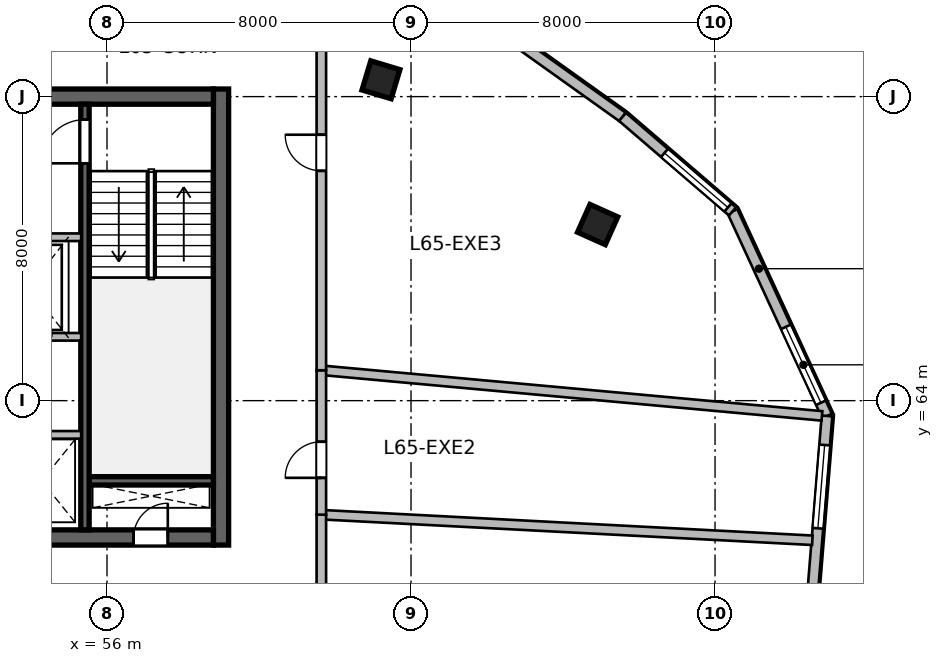
"""IFC4 building model, lengths in metres.
Left out: names, types, materials, properties, quantities, classifications, styles, units other than length and angle.
Written with IfcOpenShell. Run it as: python <this file> out.ifc"""

import sys

from ifc_helpers import new_model, si_unit, direction, frame, frame_2d, origin, origin_2d, place, context, subcontext, project, spatial, rectangle, extrude, source, transform, mapped, element, fill, save


model = new_model("IFC4")
c1 = context("Model", 3, precision=1e-05, world=origin(), true_north=direction((0.0, 1.0)))
c2 = subcontext(c1, "Body", "Model", "MODEL_VIEW")
j1 = project(units=[si_unit("LENGTHUNIT", "METRE"), si_unit("PLANEANGLEUNIT", "RADIAN")], contexts=[c1])
p1 = place(None, origin())
s1 = spatial("IfcSite", under=j1, at=p1, CompositionType="ELEMENT")
p2 = place(p1, origin())
s2 = spatial("IfcBuilding", under=s1, at=p2, CompositionType="ELEMENT")
p3 = place(p2, frame((0.0, 0.0, 267.9)))
s3 = spatial("IfcBuildingStorey", under=s2, at=p3, CompositionType="ELEMENT", Elevation=267.9)
m1 = source(origin(), c2, "Body", "SweptSolid", [
    extrude(rectangle(XDim=12.0, YDim=0.4, at=frame_2d((6.0, 0.0))), origin(), (0.0, 0.0, 1.0), 3.9),
])
p4 = place(p3, frame((59.0, 60.2, 0.0), z_axis=(0.0, 0.0, 1.0), x_axis=(0.0, 1.0, 0.0)))
e1 = element("IfcWall", 1, at=p4, inside=s3, PredefinedType="SHEAR", context=c2, shape_type="MappedRepresentation", body=[
    mapped(m1, transform((0.0, 0.0, 0.0), scale=1.0)),
])
m2 = source(origin(), c2, "Body", "SweptSolid", [
    extrude(rectangle(XDim=21.6, YDim=0.4, at=frame_2d((10.8, 0.0))), origin(), (0.0, 0.0, 1.0), 3.9),
])
p5 = place(p3, frame((37.2, 60.4, 0.0), z_axis=(0.0, 0.0, 1.0), x_axis=(1.0, 0.0, 0.0)))
e2 = element("IfcWall", 2, at=p5, inside=s3, PredefinedType="SHEAR", context=c2, shape_type="MappedRepresentation", body=[
    mapped(m2, transform((0.0, 0.0, 0.0), scale=1.0)),
])
p6 = place(p5, frame((1.1, 0.0, 0.0)))
e3 = element("IfcOpeningElement", 3, at=p6, cuts=e2, PredefinedType="OPENING", context=c2, shape_type="SweptSolid", body=[
    extrude(rectangle(XDim=1.15, YDim=2.15, at=frame_2d((0.575, 1.075))), frame((0.0, 0.21, 0.0), z_axis=(0.0, -1.0, 0.0), x_axis=(1.0, 0.0, 0.0)), (0.0, 0.0, 1.0), 0.42),
])
p7 = place(p5, frame((19.5, 0.0, 0.0)))
e4 = element("IfcOpeningElement", 4, at=p7, cuts=e2, PredefinedType="OPENING", context=c2, shape_type="SweptSolid", body=[
    extrude(rectangle(XDim=0.9, YDim=2.1, at=frame_2d((0.45, 1.05))), frame((0.0, 0.21, 0.0), z_axis=(0.0, -1.0, 0.0), x_axis=(1.0, 0.0, 0.0)), (0.0, 0.0, 1.0), 0.42),
])
p8 = place(p5, frame((12.02, 0.0, 0.0)))
e5 = element("IfcOpeningElement", 5, at=p8, cuts=e2, PredefinedType="OPENING", context=c2, shape_type="SweptSolid", body=[
    extrude(rectangle(XDim=1.6, YDim=2.15, at=frame_2d((0.8, 1.075))), frame((0.0, 0.21, 0.0), z_axis=(0.0, -1.0, 0.0), x_axis=(1.0, 0.0, 0.0)), (0.0, 0.0, 1.0), 0.42),
])
p9 = place(p3, frame((37.2, 72.0, 0.0), z_axis=(0.0, 0.0, 1.0), x_axis=(1.0, 0.0, 0.0)))
e6 = element("IfcWall", 6, at=p9, inside=s3, PredefinedType="SHEAR", context=c2, shape_type="MappedRepresentation", body=[
    mapped(m2, transform((0.0, 0.0, 0.0), scale=1.0)),
])
p10 = place(p9, frame((1.2, 0.0, 0.0)))
e7 = element("IfcOpeningElement", 7, at=p10, cuts=e6, PredefinedType="OPENING", context=c2, shape_type="SweptSolid", body=[
    extrude(rectangle(XDim=0.9, YDim=2.1, at=frame_2d((0.45, 1.05))), frame((0.0, 0.21, 0.0), z_axis=(0.0, -1.0, 0.0), x_axis=(1.0, 0.0, 0.0)), (0.0, 0.0, 1.0), 0.42),
])
p11 = place(p9, frame((14.7, 0.0, 0.0)))
e8 = element("IfcOpeningElement", 8, at=p11, cuts=e6, PredefinedType="OPENING", context=c2, shape_type="SweptSolid", body=[
    extrude(rectangle(XDim=1.2, YDim=2.15, at=frame_2d((0.6, 1.075))), frame((0.0, 0.21, 0.0), z_axis=(0.0, -1.0, 0.0), x_axis=(1.0, 0.0, 0.0)), (0.0, 0.0, 1.0), 0.42),
])
p12 = place(p9, frame((4.15, 0.0, 0.0)))
e9 = element("IfcOpeningElement", 9, at=p12, cuts=e6, PredefinedType="OPENING", context=c2, shape_type="SweptSolid", body=[
    extrude(rectangle(XDim=1.3, YDim=2.15, at=frame_2d((0.65, 1.075))), frame((0.0, 0.21, 0.0), z_axis=(0.0, -1.0, 0.0), x_axis=(1.0, 0.0, 0.0)), (0.0, 0.0, 1.0), 0.42),
])
p13 = place(p9, frame((7.25, 0.0, 0.0)))
e10 = element("IfcOpeningElement", 10, at=p13, cuts=e6, PredefinedType="OPENING", context=c2, shape_type="SweptSolid", body=[
    extrude(rectangle(XDim=0.9, YDim=2.1, at=frame_2d((0.45, 1.05))), frame((0.0, 0.21, 0.0), z_axis=(0.0, -1.0, 0.0), x_axis=(1.0, 0.0, 0.0)), (0.0, 0.0, 1.0), 0.42),
])
p14 = place(p9, frame((10.95, 0.0, 0.0)))
e11 = element("IfcOpeningElement", 11, at=p14, cuts=e6, PredefinedType="OPENING", context=c2, shape_type="SweptSolid", body=[
    extrude(rectangle(XDim=0.9, YDim=2.1, at=frame_2d((0.45, 1.05))), frame((0.0, 0.21, 0.0), z_axis=(0.0, -1.0, 0.0), x_axis=(1.0, 0.0, 0.0)), (0.0, 0.0, 1.0), 0.42),
])
m3 = source(origin(), c2, "Body", "SweptSolid", [
    extrude(rectangle(XDim=3.27, YDim=0.22, at=frame_2d((1.635, 0.0))), origin(), (0.0, 0.0, 1.0), 3.9),
])
p15 = place(p3, frame((55.53, 61.89, 0.0), z_axis=(0.0, 0.0, 1.0), x_axis=(1.0, 0.0, 0.0)))
e12 = element("IfcWall", 12, at=p15, inside=s3, PredefinedType="SHEAR", context=c2, shape_type="MappedRepresentation", body=[
    mapped(m3, transform((0.0, 0.0, 0.0), scale=1.0)),
])
m4 = source(origin(), c2, "Body", "SweptSolid", [
    extrude(rectangle(XDim=11.2, YDim=0.22, at=frame_2d((5.6, 0.0))), origin(), (0.0, 0.0, 1.0), 3.9),
])
p16 = place(p3, frame((55.42, 60.6, 0.0), z_axis=(0.0, 0.0, 1.0), x_axis=(0.0, 1.0, 0.0)))
e13 = element("IfcWall", 13, at=p16, inside=s3, PredefinedType="SHEAR", context=c2, shape_type="MappedRepresentation", body=[
    mapped(m4, transform((0.0, 0.0, 0.0), scale=1.0)),
])
p17 = place(p16, frame((9.645, 0.0, 0.0)))
e14 = element("IfcOpeningElement", 14, at=p17, cuts=e13, PredefinedType="OPENING", context=c2, shape_type="SweptSolid", body=[
    extrude(rectangle(XDim=1.15, YDim=2.15, at=frame_2d((0.575, 1.075))), frame((0.0, 0.12, 0.0), z_axis=(0.0, -1.0, 0.0), x_axis=(1.0, 0.0, 0.0)), (0.0, 0.0, 1.0), 0.24),
])
m5 = source(origin(), c2, "Body", "SweptSolid", [
    extrude(rectangle(XDim=0.8, YDim=0.8, at=origin_2d()), origin(), (0.0, 0.0, 1.0), 3.9),
])
for number, where, z_axis, x_axis in (
    (15, (63.209, 72.442, 0.0), (0.0, 0.0, 1.0), (0.289, 0.957, 0.0)),
    (16, (68.91, 68.633, 0.0), (0.0, 0.0, 1.0), (0.409, 0.912, 0.0)),
):
    element("IfcColumn", number, at=place(p3, frame(where, z_axis=z_axis, x_axis=x_axis)), inside=s3, PredefinedType="COLUMN", context=c2, shape_type="MappedRepresentation", body=[
        mapped(m5, transform((0.0, 0.0, 0.0), scale=1.0)),
    ])
m6 = source(origin(), c2, "Body", "SweptSolid", [
    extrude(rectangle(XDim=5.928, YDim=0.28, at=frame_2d((2.964, 0.0))), origin(), (0.0, 0.0, 1.0), 3.65),
])
p18 = place(p3, frame((72.459, 68.979, 0.0), z_axis=(0.0, 0.0, 1.0), x_axis=(0.41942378221, -0.907790554543, 0.0)))
e17 = element("IfcWall", 17, at=p18, inside=s3, PredefinedType="SOLIDWALL", context=c2, shape_type="MappedRepresentation", body=[
    mapped(m6, transform((0.0, 0.0, 0.0), scale=1.0)),
])
p19 = place(p18, frame((3.346, 0.0, 0.95)))
e18 = element("IfcOpeningElement", 18, at=p19, cuts=e17, PredefinedType="OPENING", context=c2, shape_type="SweptSolid", body=[
    extrude(rectangle(XDim=2.2, YDim=2.1, at=frame_2d((1.1, 1.05))), frame((0.0, 0.15, 0.0), z_axis=(0.0, -1.0, 0.0), x_axis=(1.0, 0.0, 0.0)), (0.0, 0.0, 1.0), 0.3),
])
m7 = source(origin(), c2, "Body", "SweptSolid", [
    extrude(rectangle(XDim=7.466, YDim=0.28, at=frame_2d((3.733, 0.0))), origin(), (0.0, 0.0, 1.0), 3.65),
])
p20 = place(p3, frame((74.946, 63.597, 0.0), z_axis=(0.0, 0.0, 1.0), x_axis=(-0.080804454221, -0.996729973553, 0.0)))
e19 = element("IfcWall", 19, at=p20, inside=s3, PredefinedType="SOLIDWALL", context=c2, shape_type="MappedRepresentation", body=[
    mapped(m7, transform((0.0, 0.0, 0.0), scale=1.0)),
])
p21 = place(p20, frame((0.767, 0.0, 0.95)))
e20 = element("IfcOpeningElement", 20, at=p21, cuts=e19, PredefinedType="OPENING", context=c2, shape_type="SweptSolid", body=[
    extrude(rectangle(XDim=2.2, YDim=2.1, at=frame_2d((1.1, 1.05))), frame((0.0, 0.15, 0.0), z_axis=(0.0, -1.0, 0.0), x_axis=(1.0, 0.0, 0.0)), (0.0, 0.0, 1.0), 0.3),
])
m8 = source(origin(), c2, "Body", "SweptSolid", [
    extrude(rectangle(XDim=3.757, YDim=0.28, at=frame_2d((1.879, 0.0))), origin(), (0.0, 0.0, 1.0), 3.65),
])
p22 = place(p3, frame((66.506, 73.648, 0.0), z_axis=(0.0, 0.0, 1.0), x_axis=(0.814163502266, -0.580635678871, 0.0)))
e21 = element("IfcWall", 21, at=p22, inside=s3, PredefinedType="SOLIDWALL", context=c2, shape_type="MappedRepresentation", body=[
    mapped(m8, transform((0.0, 0.0, 0.0), scale=1.0)),
])
m9 = source(origin(), c2, "Body", "SweptSolid", [
    extrude(rectangle(XDim=3.816, YDim=0.28, at=frame_2d((1.908, 0.0))), origin(), (0.0, 0.0, 1.0), 3.65),
])
p23 = place(p3, frame((69.565, 71.466, 0.0), z_axis=(0.0, 0.0, 1.0), x_axis=(0.758388845672, -0.651802392417, 0.0)))
e22 = element("IfcWall", 22, at=p23, inside=s3, PredefinedType="SOLIDWALL", context=c2, shape_type="MappedRepresentation", body=[
    mapped(m9, transform((0.0, 0.0, 0.0), scale=1.0)),
])
p24 = place(p23, frame((1.456, 0.0, 0.95)))
e23 = element("IfcOpeningElement", 23, at=p24, cuts=e22, PredefinedType="OPENING", context=c2, shape_type="SweptSolid", body=[
    extrude(rectangle(XDim=2.2, YDim=2.1, at=frame_2d((1.1, 1.05))), frame((0.0, 0.15, 0.0), z_axis=(0.0, -1.0, 0.0), x_axis=(1.0, 0.0, 0.0)), (0.0, 0.0, 1.0), 0.3),
])
m10 = source(origin(), c2, "Body", "SweptSolid", [
    extrude(rectangle(XDim=5.62, YDim=0.2, at=frame_2d((2.81, 0.0))), origin(), (0.0, 0.0, 1.0), 3.65),
])
p25 = place(p3, frame((49.7, 68.3, 0.0), z_axis=(0.0, 0.0, 1.0), x_axis=(1.0, 0.0, 0.0)))
e24 = element("IfcWall", 24, at=p25, inside=s3, PredefinedType="SOLIDWALL", context=c2, shape_type="MappedRepresentation", body=[
    mapped(m10, transform((0.0, 0.0, 0.0), scale=1.0)),
])
p26 = place(p25, frame((1.6, 0.0, 0.0)))
e25 = element("IfcOpeningElement", 25, at=p26, cuts=e24, PredefinedType="OPENING", context=c2, shape_type="SweptSolid", body=[
    extrude(rectangle(XDim=1.1, YDim=2.15, at=frame_2d((0.55, 1.075))), frame((0.0, 0.11, 0.0), z_axis=(0.0, -1.0, 0.0), x_axis=(1.0, 0.0, 0.0)), (0.0, 0.0, 1.0), 0.22),
])
p27 = place(p25, frame((3.7, 0.0, 0.0)))
e26 = element("IfcOpeningElement", 26, at=p27, cuts=e24, PredefinedType="OPENING", context=c2, shape_type="SweptSolid", body=[
    extrude(rectangle(XDim=1.1, YDim=2.15, at=frame_2d((0.55, 1.075))), frame((0.0, 0.11, 0.0), z_axis=(0.0, -1.0, 0.0), x_axis=(1.0, 0.0, 0.0)), (0.0, 0.0, 1.0), 0.22),
])
p28 = place(p3, frame((49.7, 65.68, 0.0), z_axis=(0.0, 0.0, 1.0), x_axis=(1.0, 0.0, 0.0)))
e27 = element("IfcWall", 27, at=p28, inside=s3, PredefinedType="SOLIDWALL", context=c2, shape_type="MappedRepresentation", body=[
    mapped(m10, transform((0.0, 0.0, 0.0), scale=1.0)),
])
m11 = source(origin(), c2, "Body", "SweptSolid", [
    extrude(rectangle(XDim=4.1, YDim=0.2, at=frame_2d((2.05, 0.0))), origin(), (0.0, 0.0, 1.0), 3.65),
])
p29 = place(p3, frame((51.22, 63.1, 0.0), z_axis=(0.0, 0.0, 1.0), x_axis=(1.0, 0.0, 0.0)))
e28 = element("IfcWall", 28, at=p29, inside=s3, PredefinedType="SOLIDWALL", context=c2, shape_type="MappedRepresentation", body=[
    mapped(m11, transform((0.0, 0.0, 0.0), scale=1.0)),
])
m12 = source(origin(), c2, "Body", "SweptSolid", [
    extrude(rectangle(XDim=12.938, YDim=0.25, at=frame_2d((6.469, 0.0))), origin(), (0.0, 0.0, 1.0), 3.65),
])
p30 = place(p3, frame((61.64, 61.0, 0.0), z_axis=(0.0, 0.0, 1.0), x_axis=(0.998643821866, -0.052062626215, 0.0)))
e29 = element("IfcWall", 29, at=p30, inside=s3, PredefinedType="PARTITIONING", context=c2, shape_type="MappedRepresentation", body=[
    mapped(m12, transform((0.0, 0.0, 0.0), scale=1.0)),
])
m13 = source(origin(), c2, "Body", "SweptSolid", [
    extrude(rectangle(XDim=3.04, YDim=0.25, at=frame_2d((1.52, 0.0))), origin(), (0.0, 0.0, 1.0), 3.65),
])
p31 = place(p3, frame((61.64, 57.96, 0.0), z_axis=(0.0, 0.0, 1.0), x_axis=(0.0, 1.0, 0.0)))
e30 = element("IfcWall", 30, at=p31, inside=s3, PredefinedType="PARTITIONING", context=c2, shape_type="MappedRepresentation", body=[
    mapped(m13, transform((0.0, 0.0, 0.0), scale=1.0)),
])
m14 = source(origin(), c2, "Body", "SweptSolid", [
    extrude(rectangle(XDim=13.228, YDim=0.25, at=frame_2d((6.614, 0.0))), origin(), (0.0, 0.0, 1.0), 3.65),
])
p32 = place(p3, frame((61.64, 64.8, 0.0), z_axis=(0.0, 0.0, 1.0), x_axis=(0.995868510157, -0.090806995755, 0.0)))
e31 = element("IfcWall", 31, at=p32, inside=s3, PredefinedType="PARTITIONING", context=c2, shape_type="MappedRepresentation", body=[
    mapped(m14, transform((0.0, 0.0, 0.0), scale=1.0)),
])
m15 = source(origin(), c2, "Body", "SweptSolid", [
    extrude(rectangle(XDim=3.8, YDim=0.25, at=frame_2d((1.9, 0.0))), origin(), (0.0, 0.0, 1.0), 3.65),
])
p33 = place(p3, frame((61.64, 61.0, 0.0), z_axis=(0.0, 0.0, 1.0), x_axis=(0.0, 1.0, 0.0)))
e32 = element("IfcWall", 32, at=p33, inside=s3, PredefinedType="PARTITIONING", context=c2, shape_type="MappedRepresentation", body=[
    mapped(m15, transform((0.0, 0.0, 0.0), scale=1.0)),
])
p34 = place(p33, frame((0.969, 0.0, 0.0)))
e33 = element("IfcOpeningElement", 33, at=p34, cuts=e32, PredefinedType="OPENING", context=c2, shape_type="SweptSolid", body=[
    extrude(rectangle(XDim=0.95, YDim=2.1, at=frame_2d((0.475, 1.05))), frame((0.0, 0.135, 0.0), z_axis=(0.0, -1.0, 0.0), x_axis=(1.0, 0.0, 0.0)), (0.0, 0.0, 1.0), 0.27),
])
m16 = source(origin(), c2, "Body", "SweptSolid", [
    extrude(rectangle(XDim=11.445, YDim=0.25, at=frame_2d((5.722, 0.0))), origin(), (0.0, 0.0, 1.0), 3.65),
])
p35 = place(p3, frame((61.64, 64.8, 0.0), z_axis=(0.0, 0.0, 1.0), x_axis=(0.0, 1.0, 0.0)))
e34 = element("IfcWall", 34, at=p35, inside=s3, PredefinedType="PARTITIONING", context=c2, shape_type="MappedRepresentation", body=[
    mapped(m16, transform((0.0, 0.0, 0.0), scale=1.0)),
])
p36 = place(p35, frame((5.247, 0.0, 0.0)))
e35 = element("IfcOpeningElement", 35, at=p36, cuts=e34, PredefinedType="OPENING", context=c2, shape_type="SweptSolid", body=[
    extrude(rectangle(XDim=0.95, YDim=2.1, at=frame_2d((0.475, 1.05))), frame((0.0, 0.135, 0.0), z_axis=(0.0, -1.0, 0.0), x_axis=(1.0, 0.0, 0.0)), (0.0, 0.0, 1.0), 0.27),
])
m17 = source(origin(), c2, "Body", "SweptSolid", [
    extrude(rectangle(XDim=2.2, YDim=2.1, at=frame_2d((1.1, 1.05))), frame((0.0, 0.03, 0.0), z_axis=(0.0, -1.0, 0.0), x_axis=(1.0, 0.0, 0.0)), (0.0, 0.0, 1.0), 0.06),
])
p37 = place(p19, origin())
e36 = element("IfcWindow", 36, at=p37, inside=s3, PartitioningType="TRIPLE_PANEL_VERTICAL", PredefinedType="WINDOW", context=c2, shape_type="MappedRepresentation", body=[
    mapped(m17, transform((0.0, 0.0, 0.0), scale=1.0)),
])
fill(e18, e36)
p38 = place(p21, origin())
e37 = element("IfcWindow", 37, at=p38, inside=s3, PartitioningType="TRIPLE_PANEL_VERTICAL", PredefinedType="WINDOW", context=c2, shape_type="MappedRepresentation", body=[
    mapped(m17, transform((0.0, 0.0, 0.0), scale=1.0)),
])
fill(e20, e37)
p39 = place(p24, origin())
e38 = element("IfcWindow", 38, at=p39, inside=s3, PartitioningType="TRIPLE_PANEL_VERTICAL", PredefinedType="WINDOW", context=c2, shape_type="MappedRepresentation", body=[
    mapped(m17, transform((0.0, 0.0, 0.0), scale=1.0)),
])
fill(e23, e38)
m18 = source(origin(), c2, "Body", "SweptSolid", [
    extrude(rectangle(XDim=0.9, YDim=2.1, at=frame_2d((0.45, 1.05))), frame((0.0, 0.025, 0.0), z_axis=(0.0, -1.0, 0.0), x_axis=(1.0, 0.0, 0.0)), (0.0, 0.0, 1.0), 0.05),
])
p40 = place(p7, origin())
e39 = element("IfcDoor", 39, at=p40, inside=s3, OperationType="SINGLE_SWING_RIGHT", PredefinedType="DOOR", context=c2, shape_type="MappedRepresentation", body=[
    mapped(m18, transform((0.0, 0.0, 0.0), scale=1.0)),
])
fill(e4, e39)
m19 = source(origin(), c2, "Body", "SweptSolid", [
    extrude(rectangle(XDim=1.15, YDim=2.15, at=frame_2d((0.575, 1.075))), frame((0.0, 0.025, 0.0), z_axis=(0.0, -1.0, 0.0), x_axis=(1.0, 0.0, 0.0)), (0.0, 0.0, 1.0), 0.05),
])
p41 = place(p17, origin())
e40 = element("IfcDoor", 40, at=p41, inside=s3, OperationType="SINGLE_SWING_LEFT", PredefinedType="DOOR", context=c2, shape_type="MappedRepresentation", body=[
    mapped(m19, transform((0.0, 0.0, 0.0), scale=1.0)),
])
fill(e14, e40)
m20 = source(origin(), c2, "Body", "SweptSolid", [
    extrude(rectangle(XDim=0.95, YDim=2.1, at=frame_2d((0.475, 1.05))), frame((0.0, 0.025, 0.0), z_axis=(0.0, -1.0, 0.0), x_axis=(1.0, 0.0, 0.0)), (0.0, 0.0, 1.0), 0.05),
])
p42 = place(p34, origin())
e41 = element("IfcDoor", 41, at=p42, inside=s3, OperationType="SINGLE_SWING_LEFT", PredefinedType="DOOR", context=c2, shape_type="MappedRepresentation", body=[
    mapped(m20, transform((0.0, 0.0, 0.0), scale=1.0)),
])
fill(e33, e41)
p43 = place(p36, origin())
e42 = element("IfcDoor", 42, at=p43, inside=s3, OperationType="SINGLE_SWING_RIGHT", PredefinedType="DOOR", context=c2, shape_type="MappedRepresentation", body=[
    mapped(m20, transform((0.0, 0.0, 0.0), scale=1.0)),
])
fill(e35, e42)
save(model, sys.argv[1])
